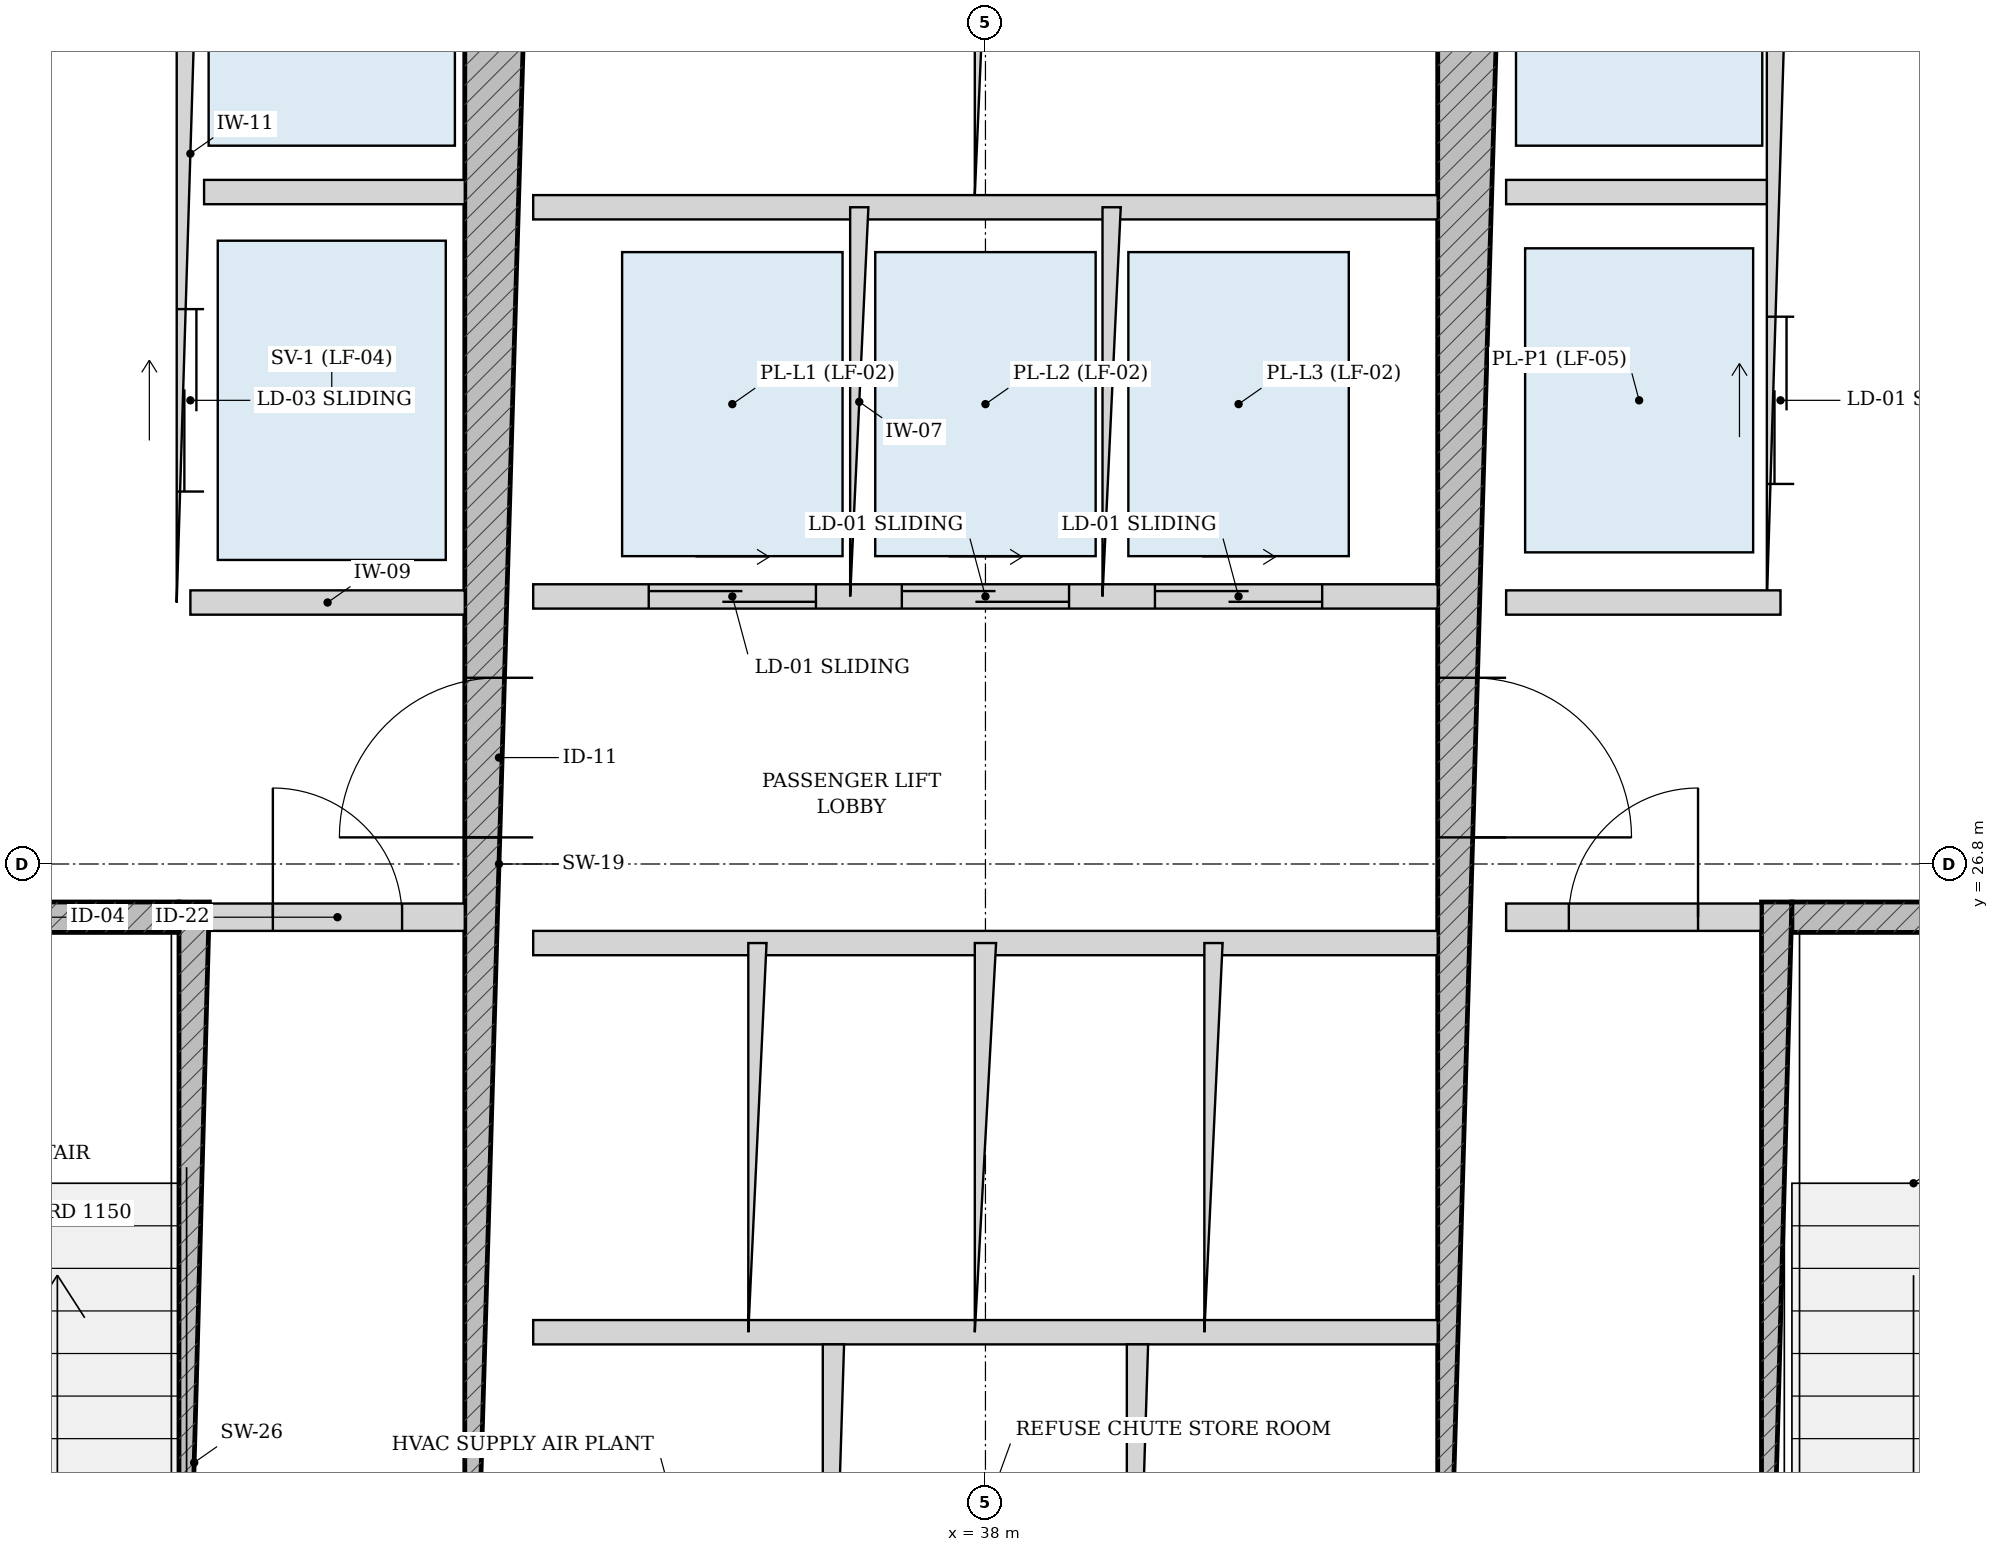
"""IFC4 building model, lengths in metres.
Left out: names, types, materials, properties, quantities, classifications, styles, units other than length and angle.
Written with IfcOpenShell. Run it as: python <this file> out.ifc"""

import sys

from ifc_helpers import new_model, si_unit, direction, frame, frame_2d, origin, place, context, subcontext, project, spatial, rectangle, extrude, source, transform, mapped, element, fill, save


model = new_model("IFC4")
c1 = context("Model", 3, precision=1e-05, world=origin(), true_north=direction((-0.2419218956, 0.970295726276)))
c2 = subcontext(c1, "Body", "Model", "MODEL_VIEW")
j1 = project(units=[si_unit("LENGTHUNIT", "METRE"), si_unit("PLANEANGLEUNIT", "RADIAN")], contexts=[c1])
p1 = place(None, origin())
s1 = spatial("IfcSite", under=j1, at=p1, CompositionType="ELEMENT")
p2 = place(p1, origin())
s2 = spatial("IfcBuilding", under=s1, at=p2, CompositionType="ELEMENT")
p3 = place(p2, frame((0.0, 0.0, 9.9)))
s3 = spatial("IfcBuildingStorey", under=s2, at=p3, CompositionType="ELEMENT", Elevation=9.9)
p4 = place(p3, frame((32.795, 19.175, 0.0), z_axis=(0.0, 0.0, 1.0), x_axis=(0.0, 1.0, 0.0)))
e1 = element("IfcWall", 1, at=p4, inside=s3, PredefinedType="SOLIDWALL", context=c2, shape_type="SweptSolid", body=[
    extrude(rectangle(XDim=7.375, YDim=0.2, at=frame_2d((3.688, 0.0))), origin(), (0.0, 0.0, 1.0), 4.2),
])
p5 = place(p3, frame((29.375, 26.45, 0.0), z_axis=(0.0, 0.0, 1.0), x_axis=(1.0, 0.0, 0.0)))
e2 = element("IfcWall", 2, at=p5, inside=s3, PredefinedType="SOLIDWALL", context=c2, shape_type="SweptSolid", body=[
    extrude(rectangle(XDim=3.32, YDim=0.2, at=frame_2d((1.66, 0.0))), origin(), (0.0, 0.0, 1.0), 4.2),
])
p6 = place(p5, frame((1.185, 0.0, 0.0)))
e3 = element("IfcOpeningElement", 3, at=p6, cuts=e2, PredefinedType="OPENING", context=c2, shape_type="SweptSolid", body=[
    extrude(rectangle(XDim=0.95, YDim=2.15, at=frame_2d((0.475, 1.075))), frame((0.0, 0.11, 0.0), z_axis=(0.0, -1.0, 0.0), x_axis=(1.0, 0.0, 0.0)), (0.0, 0.0, 1.0), 0.22),
])
p7 = place(p3, frame((43.205, 19.175, 0.0), z_axis=(0.0, 0.0, 1.0), x_axis=(0.0, 1.0, 0.0)))
e4 = element("IfcWall", 4, at=p7, inside=s3, PredefinedType="SOLIDWALL", context=c2, shape_type="SweptSolid", body=[
    extrude(rectangle(XDim=7.375, YDim=0.2, at=frame_2d((3.688, 0.0))), origin(), (0.0, 0.0, 1.0), 4.2),
])
p8 = place(p3, frame((43.305, 26.45, 0.0), z_axis=(0.0, 0.0, 1.0), x_axis=(1.0, 0.0, 0.0)))
e5 = element("IfcWall", 5, at=p8, inside=s3, PredefinedType="SOLIDWALL", context=c2, shape_type="SweptSolid", body=[
    extrude(rectangle(XDim=3.32, YDim=0.2, at=frame_2d((1.66, 0.0))), origin(), (0.0, 0.0, 1.0), 4.2),
])
p9 = place(p8, frame((1.185, 0.0, 0.0)))
e6 = element("IfcOpeningElement", 6, at=p9, cuts=e5, PredefinedType="OPENING", context=c2, shape_type="SweptSolid", body=[
    extrude(rectangle(XDim=0.95, YDim=2.15, at=frame_2d((0.475, 1.075))), frame((0.0, 0.11, 0.0), z_axis=(0.0, -1.0, 0.0), x_axis=(1.0, 0.0, 0.0)), (0.0, 0.0, 1.0), 0.22),
])
p10 = place(p3, frame((34.8, 19.175, 0.0), z_axis=(0.0, 0.0, 1.0), x_axis=(0.0, 1.0, 0.0)))
e7 = element("IfcWall", 7, at=p10, inside=s3, PredefinedType="SHEAR", context=c2, shape_type="SweptSolid", body=[
    extrude(rectangle(XDim=15.25, YDim=0.45, at=frame_2d((7.625, 0.0))), origin(), (0.0, 0.0, 1.0), 4.2),
])
p11 = place(p10, frame((7.8, 0.0, 0.0)))
e8 = element("IfcOpeningElement", 8, at=p11, cuts=e7, PredefinedType="OPENING", context=c2, shape_type="SweptSolid", body=[
    extrude(rectangle(XDim=1.05, YDim=2.15, at=frame_2d((0.525, 1.075))), frame((0.0, 0.235, 0.0), z_axis=(0.0, -1.0, 0.0), x_axis=(1.0, 0.0, 0.0)), (0.0, 0.0, 1.0), 0.47),
])
p12 = place(p3, frame((41.2, 19.175, 0.0), z_axis=(0.0, 0.0, 1.0), x_axis=(0.0, 1.0, 0.0)))
e9 = element("IfcWall", 9, at=p12, inside=s3, PredefinedType="SHEAR", context=c2, shape_type="SweptSolid", body=[
    extrude(rectangle(XDim=15.25, YDim=0.45, at=frame_2d((7.625, 0.0))), origin(), (0.0, 0.0, 1.0), 4.2),
])
p13 = place(p12, frame((7.8, 0.0, 0.0)))
e10 = element("IfcOpeningElement", 10, at=p13, cuts=e9, PredefinedType="OPENING", context=c2, shape_type="SweptSolid", body=[
    extrude(rectangle(XDim=1.05, YDim=2.15, at=frame_2d((0.525, 1.075))), frame((0.0, 0.235, 0.0), z_axis=(0.0, -1.0, 0.0), x_axis=(1.0, 0.0, 0.0)), (0.0, 0.0, 1.0), 0.47),
])
p14 = place(p3, frame((32.9, 26.45, 0.0), z_axis=(0.0, 0.0, 1.0), x_axis=(1.0, 0.0, 0.0)))
e11 = element("IfcWall", 11, at=p14, inside=s3, PredefinedType="PARTITIONING", context=c2, shape_type="SweptSolid", body=[
    extrude(rectangle(XDim=1.675, YDim=0.18, at=frame_2d((0.837, 0.0))), origin(), (0.0, 0.0, 1.0), 4.2),
])
p15 = place(p14, frame((0.413, 0.0, 0.0)))
e12 = element("IfcOpeningElement", 12, at=p15, cuts=e11, PredefinedType="OPENING", context=c2, shape_type="SweptSolid", body=[
    extrude(rectangle(XDim=0.85, YDim=2.1, at=frame_2d((0.425, 1.05))), frame((0.0, 0.1, 0.0), z_axis=(0.0, -1.0, 0.0), x_axis=(1.0, 0.0, 0.0)), (0.0, 0.0, 1.0), 0.2),
])
p16 = place(p3, frame((41.425, 26.45, 0.0), z_axis=(0.0, 0.0, 1.0), x_axis=(1.0, 0.0, 0.0)))
e13 = element("IfcWall", 13, at=p16, inside=s3, PredefinedType="PARTITIONING", context=c2, shape_type="SweptSolid", body=[
    extrude(rectangle(XDim=1.675, YDim=0.18, at=frame_2d((0.837, 0.0))), origin(), (0.0, 0.0, 1.0), 4.2),
])
p17 = place(p16, frame((0.413, 0.0, 0.0)))
e14 = element("IfcOpeningElement", 14, at=p17, cuts=e13, PredefinedType="OPENING", context=c2, shape_type="SweptSolid", body=[
    extrude(rectangle(XDim=0.85, YDim=2.1, at=frame_2d((0.425, 1.05))), frame((0.0, 0.1, 0.0), z_axis=(0.0, -1.0, 0.0), x_axis=(1.0, 0.0, 0.0)), (0.0, 0.0, 1.0), 0.2),
])
p18 = place(p3, frame((32.77, 28.52, 0.0), z_axis=(0.0, 0.0, 1.0), x_axis=(0.0, 1.0, 0.0)))
e15 = element("IfcWall", 15, at=p18, inside=s3, PredefinedType="PARTITIONING", context=c2, shape_type="SweptSolid", body=[
    extrude(rectangle(XDim=5.905, YDim=0.18, at=frame_2d((2.953, 0.0))), origin(), (0.0, 0.0, 1.0), 4.2),
])
p19 = place(p18, frame((3.655, 0.0, 0.0)))
e16 = element("IfcOpeningElement", 16, at=p19, cuts=e15, PredefinedType="OPENING", context=c2, shape_type="SweptSolid", body=[
    extrude(rectangle(XDim=1.15, YDim=2.2, at=frame_2d((0.575, 1.1))), frame((0.0, 0.1, 0.0), z_axis=(0.0, -1.0, 0.0), x_axis=(1.0, 0.0, 0.0)), (0.0, 0.0, 1.0), 0.2),
])
p20 = place(p18, frame((0.73, 0.0, 0.0)))
e17 = element("IfcOpeningElement", 17, at=p20, cuts=e15, PredefinedType="OPENING", context=c2, shape_type="SweptSolid", body=[
    extrude(rectangle(XDim=1.2, YDim=2.25, at=frame_2d((0.6, 1.125))), frame((0.0, 0.1, 0.0), z_axis=(0.0, -1.0, 0.0), x_axis=(1.0, 0.0, 0.0)), (0.0, 0.0, 1.0), 0.2),
])
p21 = place(p3, frame((32.86, 31.22, 0.0), z_axis=(0.0, 0.0, 1.0), x_axis=(1.0, 0.0, 0.0)))
e18 = element("IfcWall", 18, at=p21, inside=s3, PredefinedType="PARTITIONING", context=c2, shape_type="SweptSolid", body=[
    extrude(rectangle(XDim=1.715, YDim=0.16, at=frame_2d((0.857, 0.0))), origin(), (0.0, 0.0, 1.0), 4.2),
])
p22 = place(p3, frame((32.77, 28.52, 0.0), z_axis=(0.0, 0.0, 1.0), x_axis=(1.0, 0.0, 0.0)))
e19 = element("IfcWall", 19, at=p22, inside=s3, PredefinedType="PARTITIONING", context=c2, shape_type="SweptSolid", body=[
    extrude(rectangle(XDim=1.805, YDim=0.16, at=frame_2d((0.902, 0.0))), origin(), (0.0, 0.0, 1.0), 4.2),
])
p23 = place(p3, frame((43.23, 28.52, 0.0), z_axis=(0.0, 0.0, 1.0), x_axis=(0.0, 1.0, 0.0)))
e20 = element("IfcWall", 20, at=p23, inside=s3, PredefinedType="PARTITIONING", context=c2, shape_type="SweptSolid", body=[
    extrude(rectangle(XDim=5.905, YDim=0.18, at=frame_2d((2.953, 0.0))), origin(), (0.0, 0.0, 1.0), 4.2),
])
p24 = place(p23, frame((3.655, 0.0, 0.0)))
e21 = element("IfcOpeningElement", 21, at=p24, cuts=e20, PredefinedType="OPENING", context=c2, shape_type="SweptSolid", body=[
    extrude(rectangle(XDim=1.15, YDim=2.2, at=frame_2d((0.575, 1.1))), frame((0.0, 0.1, 0.0), z_axis=(0.0, -1.0, 0.0), x_axis=(1.0, 0.0, 0.0)), (0.0, 0.0, 1.0), 0.2),
])
p25 = place(p23, frame((0.78, 0.0, 0.0)))
e22 = element("IfcOpeningElement", 22, at=p25, cuts=e20, PredefinedType="OPENING", context=c2, shape_type="SweptSolid", body=[
    extrude(rectangle(XDim=1.1, YDim=2.2, at=frame_2d((0.55, 1.1))), frame((0.0, 0.1, 0.0), z_axis=(0.0, -1.0, 0.0), x_axis=(1.0, 0.0, 0.0)), (0.0, 0.0, 1.0), 0.2),
])
p26 = place(p3, frame((41.425, 31.22, 0.0), z_axis=(0.0, 0.0, 1.0), x_axis=(1.0, 0.0, 0.0)))
e23 = element("IfcWall", 23, at=p26, inside=s3, PredefinedType="PARTITIONING", context=c2, shape_type="SweptSolid", body=[
    extrude(rectangle(XDim=1.715, YDim=0.16, at=frame_2d((0.857, 0.0))), origin(), (0.0, 0.0, 1.0), 4.2),
])
p27 = place(p3, frame((41.425, 28.52, 0.0), z_axis=(0.0, 0.0, 1.0), x_axis=(1.0, 0.0, 0.0)))
e24 = element("IfcWall", 24, at=p27, inside=s3, PredefinedType="PARTITIONING", context=c2, shape_type="SweptSolid", body=[
    extrude(rectangle(XDim=1.805, YDim=0.16, at=frame_2d((0.902, 0.0))), origin(), (0.0, 0.0, 1.0), 4.2),
])
p28 = place(p3, frame((35.025, 28.56, 0.0), z_axis=(0.0, 0.0, 1.0), x_axis=(1.0, 0.0, 0.0)))
e25 = element("IfcWall", 25, at=p28, inside=s3, PredefinedType="PARTITIONING", context=c2, shape_type="SweptSolid", body=[
    extrude(rectangle(XDim=5.95, YDim=0.16, at=frame_2d((2.975, 0.0))), origin(), (0.0, 0.0, 1.0), 4.2),
])
p29 = place(p28, frame((0.76, 0.0, 0.0)))
e26 = element("IfcOpeningElement", 26, at=p29, cuts=e25, PredefinedType="OPENING", context=c2, shape_type="SweptSolid", body=[
    extrude(rectangle(XDim=1.1, YDim=2.2, at=frame_2d((0.55, 1.1))), frame((0.0, 0.09, 0.0), z_axis=(0.0, -1.0, 0.0), x_axis=(1.0, 0.0, 0.0)), (0.0, 0.0, 1.0), 0.18),
])
p30 = place(p28, frame((2.425, 0.0, 0.0)))
e27 = element("IfcOpeningElement", 27, at=p30, cuts=e25, PredefinedType="OPENING", context=c2, shape_type="SweptSolid", body=[
    extrude(rectangle(XDim=1.1, YDim=2.2, at=frame_2d((0.55, 1.1))), frame((0.0, 0.09, 0.0), z_axis=(0.0, -1.0, 0.0), x_axis=(1.0, 0.0, 0.0)), (0.0, 0.0, 1.0), 0.18),
])
p31 = place(p28, frame((4.09, 0.0, 0.0)))
e28 = element("IfcOpeningElement", 28, at=p31, cuts=e25, PredefinedType="OPENING", context=c2, shape_type="SweptSolid", body=[
    extrude(rectangle(XDim=1.1, YDim=2.2, at=frame_2d((0.55, 1.1))), frame((0.0, 0.09, 0.0), z_axis=(0.0, -1.0, 0.0), x_axis=(1.0, 0.0, 0.0)), (0.0, 0.0, 1.0), 0.18),
])
p32 = place(p3, frame((35.025, 31.12, 0.0), z_axis=(0.0, 0.0, 1.0), x_axis=(1.0, 0.0, 0.0)))
e29 = element("IfcWall", 29, at=p32, inside=s3, PredefinedType="PARTITIONING", context=c2, shape_type="SweptSolid", body=[
    extrude(rectangle(XDim=5.95, YDim=0.16, at=frame_2d((2.975, 0.0))), origin(), (0.0, 0.0, 1.0), 4.2),
])
for number, where, z_axis, x_axis in (
    (30, (37.17, 28.56, 0.0), (0.0, 0.0, 1.0), (0.0, 1.0, 0.0)),
    (31, (38.83, 28.56, 0.0), (0.0, 0.0, 1.0), (0.0, 1.0, 0.0)),
):
    element("IfcWall", number, at=place(p3, frame(where, z_axis=z_axis, x_axis=x_axis)), inside=s3, PredefinedType="PARTITIONING", context=c2, shape_type="SweptSolid", body=[
        extrude(rectangle(XDim=2.56, YDim=0.12, at=frame_2d((1.28, 0.0))), origin(), (0.0, 0.0, 1.0), 4.2),
    ])
p33 = place(p3, frame((38.0, 31.2, 0.0), z_axis=(0.0, 0.0, 1.0), x_axis=(0.0, 1.0, 0.0)))
e32 = element("IfcWall", 32, at=p33, inside=s3, PredefinedType="PARTITIONING", context=c2, shape_type="SweptSolid", body=[
    extrude(rectangle(XDim=3.225, YDim=0.14, at=frame_2d((1.613, 0.0))), origin(), (0.0, 0.0, 1.0), 4.2),
])
for number, where, z_axis, x_axis in (
    (33, (35.025, 26.28, 0.0), (0.0, 0.0, 1.0), (1.0, 0.0, 0.0)),
    (34, (35.025, 23.72, 0.0), (0.0, 0.0, 1.0), (1.0, 0.0, 0.0)),
):
    element("IfcWall", number, at=place(p3, frame(where, z_axis=z_axis, x_axis=x_axis)), inside=s3, PredefinedType="PARTITIONING", context=c2, shape_type="SweptSolid", body=[
        extrude(rectangle(XDim=5.95, YDim=0.16, at=frame_2d((2.975, 0.0))), origin(), (0.0, 0.0, 1.0), 4.2),
    ])
p34 = place(p3, frame((36.5, 23.72, 0.0), z_axis=(0.0, 0.0, 1.0), x_axis=(0.0, 1.0, 0.0)))
e35 = element("IfcWall", 35, at=p34, inside=s3, PredefinedType="PARTITIONING", context=c2, shape_type="SweptSolid", body=[
    extrude(rectangle(XDim=2.56, YDim=0.12, at=frame_2d((1.28, 0.0))), origin(), (0.0, 0.0, 1.0), 4.2),
])
p35 = place(p3, frame((38.0, 23.72, 0.0), z_axis=(0.0, 0.0, 1.0), x_axis=(0.0, 1.0, 0.0)))
e36 = element("IfcWall", 36, at=p35, inside=s3, PredefinedType="PARTITIONING", context=c2, shape_type="SweptSolid", body=[
    extrude(rectangle(XDim=2.56, YDim=0.14, at=frame_2d((1.28, 0.0))), origin(), (0.0, 0.0, 1.0), 4.2),
])
p36 = place(p3, frame((39.5, 23.72, 0.0), z_axis=(0.0, 0.0, 1.0), x_axis=(0.0, 1.0, 0.0)))
e37 = element("IfcWall", 37, at=p36, inside=s3, PredefinedType="PARTITIONING", context=c2, shape_type="SweptSolid", body=[
    extrude(rectangle(XDim=2.56, YDim=0.12, at=frame_2d((1.28, 0.0))), origin(), (0.0, 0.0, 1.0), 4.2),
])
p37 = place(p3, frame((37.0, 19.175, 0.0), z_axis=(0.0, 0.0, 1.0), x_axis=(0.0, 1.0, 0.0)))
e38 = element("IfcWall", 38, at=p37, inside=s3, PredefinedType="PARTITIONING", context=c2, shape_type="SweptSolid", body=[
    extrude(rectangle(XDim=4.465, YDim=0.14, at=frame_2d((2.232, 0.0))), origin(), (0.0, 0.0, 1.0), 4.2),
])
p38 = place(p37, frame((1.808, 0.0, 0.0)))
e39 = element("IfcOpeningElement", 39, at=p38, cuts=e38, PredefinedType="OPENING", context=c2, shape_type="SweptSolid", body=[
    extrude(rectangle(XDim=0.85, YDim=2.1, at=frame_2d((0.425, 1.05))), frame((0.0, 0.08, 0.0), z_axis=(0.0, -1.0, 0.0), x_axis=(1.0, 0.0, 0.0)), (0.0, 0.0, 1.0), 0.16),
])
p39 = place(p3, frame((39.0, 19.175, 0.0), z_axis=(0.0, 0.0, 1.0), x_axis=(0.0, 1.0, 0.0)))
e40 = element("IfcWall", 40, at=p39, inside=s3, PredefinedType="PARTITIONING", context=c2, shape_type="SweptSolid", body=[
    extrude(rectangle(XDim=4.465, YDim=0.14, at=frame_2d((2.232, 0.0))), origin(), (0.0, 0.0, 1.0), 4.2),
])
p40 = place(p39, frame((1.808, 0.0, 0.0)))
e41 = element("IfcOpeningElement", 41, at=p40, cuts=e40, PredefinedType="OPENING", context=c2, shape_type="SweptSolid", body=[
    extrude(rectangle(XDim=0.85, YDim=2.1, at=frame_2d((0.425, 1.05))), frame((0.0, 0.08, 0.0), z_axis=(0.0, -1.0, 0.0), x_axis=(1.0, 0.0, 0.0)), (0.0, 0.0, 1.0), 0.16),
])
m1 = source(origin(), c2, "Body", "SweptSolid", [
    extrude(rectangle(XDim=1.05, YDim=2.15, at=frame_2d((0.525, 1.075))), frame((0.0, 0.025, 0.0), z_axis=(0.0, -1.0, 0.0), x_axis=(1.0, 0.0, 0.0)), (0.0, 0.0, 1.0), 0.05),
])
p41 = place(p11, origin())
e42 = element("IfcDoor", 42, at=p41, inside=s3, OperationType="SINGLE_SWING_LEFT", PredefinedType="DOOR", context=c2, shape_type="MappedRepresentation", body=[
    mapped(m1, transform((0.0, 0.0, 0.0), scale=1.0)),
])
fill(e8, e42)
p42 = place(p13, frame((1.05, 0.0, 0.0), z_axis=(0.0, 0.0, 1.0), x_axis=(-1.0, 0.0, 0.0)))
e43 = element("IfcDoor", 43, at=p42, inside=s3, OperationType="SINGLE_SWING_RIGHT", PredefinedType="DOOR", context=c2, shape_type="MappedRepresentation", body=[
    mapped(m1, transform((0.0, 0.0, 0.0), scale=1.0)),
])
fill(e10, e43)
m2 = source(origin(), c2, "Body", "SweptSolid", [
    extrude(rectangle(XDim=0.85, YDim=2.1, at=frame_2d((0.425, 1.05))), frame((0.0, 0.025, 0.0), z_axis=(0.0, -1.0, 0.0), x_axis=(1.0, 0.0, 0.0)), (0.0, 0.0, 1.0), 0.05),
])
p43 = place(p15, origin())
e44 = element("IfcDoor", 44, at=p43, inside=s3, OperationType="SINGLE_SWING_LEFT", PredefinedType="DOOR", context=c2, shape_type="MappedRepresentation", body=[
    mapped(m2, transform((0.0, 0.0, 0.0), scale=1.0)),
])
fill(e12, e44)
p44 = place(p17, origin())
e45 = element("IfcDoor", 45, at=p44, inside=s3, OperationType="SINGLE_SWING_RIGHT", PredefinedType="DOOR", context=c2, shape_type="MappedRepresentation", body=[
    mapped(m2, transform((0.0, 0.0, 0.0), scale=1.0)),
])
fill(e14, e45)
m3 = source(origin(), c2, "Body", "SweptSolid", [
    extrude(rectangle(XDim=1.2, YDim=2.25, at=frame_2d((0.6, 1.125))), frame((0.0, 0.025, 0.0), z_axis=(0.0, -1.0, 0.0), x_axis=(1.0, 0.0, 0.0)), (0.0, 0.0, 1.0), 0.05),
])
p45 = place(p20, origin())
e46 = element("IfcDoor", 46, at=p45, inside=s3, OperationType="DOUBLE_DOOR_SLIDING", PredefinedType="DOOR", context=c2, shape_type="MappedRepresentation", body=[
    mapped(m3, transform((0.0, 0.0, 0.0), scale=1.0)),
])
fill(e17, e46)
m4 = source(origin(), c2, "Body", "SweptSolid", [
    extrude(rectangle(XDim=1.1, YDim=2.2, at=frame_2d((0.55, 1.1))), frame((0.0, 0.025, 0.0), z_axis=(0.0, -1.0, 0.0), x_axis=(1.0, 0.0, 0.0)), (0.0, 0.0, 1.0), 0.05),
])
p46 = place(p25, origin())
e47 = element("IfcDoor", 47, at=p46, inside=s3, OperationType="DOUBLE_DOOR_SLIDING", PredefinedType="DOOR", context=c2, shape_type="MappedRepresentation", body=[
    mapped(m4, transform((0.0, 0.0, 0.0), scale=1.0)),
])
fill(e22, e47)
p47 = place(p29, origin())
e48 = element("IfcDoor", 48, at=p47, inside=s3, OperationType="DOUBLE_DOOR_SLIDING", PredefinedType="DOOR", context=c2, shape_type="MappedRepresentation", body=[
    mapped(m4, transform((0.0, 0.0, 0.0), scale=1.0)),
])
fill(e26, e48)
p48 = place(p30, origin())
e49 = element("IfcDoor", 49, at=p48, inside=s3, OperationType="DOUBLE_DOOR_SLIDING", PredefinedType="DOOR", context=c2, shape_type="MappedRepresentation", body=[
    mapped(m4, transform((0.0, 0.0, 0.0), scale=1.0)),
])
fill(e27, e49)
p49 = place(p31, origin())
e50 = element("IfcDoor", 50, at=p49, inside=s3, OperationType="DOUBLE_DOOR_SLIDING", PredefinedType="DOOR", context=c2, shape_type="MappedRepresentation", body=[
    mapped(m4, transform((0.0, 0.0, 0.0), scale=1.0)),
])
fill(e28, e50)
save(model, sys.argv[1])
